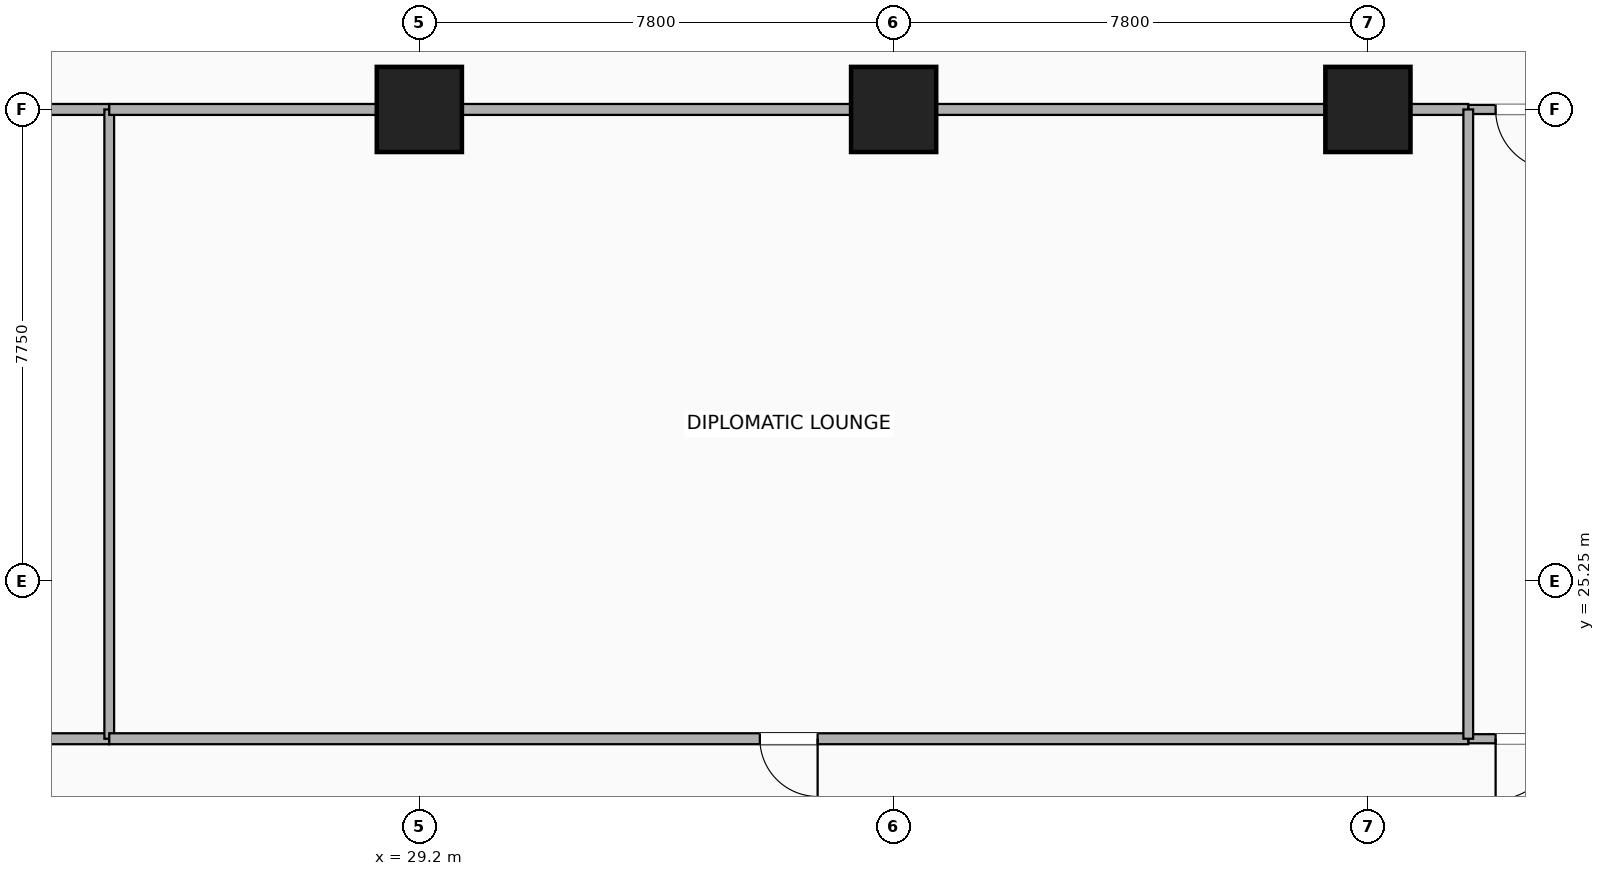
"""IFC4 building model, lengths in metres.
Left out: names, types, materials, properties, quantities, classifications, styles, units other than length and angle.
Written with IfcOpenShell. Run it as: python <this file> out.ifc"""

import sys

from ifc_helpers import new_model, si_unit, direction, frame, frame_2d, origin, origin_2d, place, context, subcontext, project, spatial, rectangle, extrude, element, fill, save


model = new_model("IFC4")
c1 = context("Model", 3, precision=1e-05, world=origin(), true_north=direction((0.0, 1.0)))
c2 = subcontext(c1, "Body", "Model", "MODEL_VIEW")
j1 = project(units=[si_unit("LENGTHUNIT", "METRE"), si_unit("PLANEANGLEUNIT", "RADIAN")], contexts=[c1])
p1 = place(None, origin())
s1 = spatial("IfcSite", under=j1, at=p1, CompositionType="ELEMENT")
p2 = place(p1, origin())
s2 = spatial("IfcBuilding", under=s1, at=p2, CompositionType="ELEMENT")
p3 = place(p2, frame((0.0, 0.0, 68.4)))
s3 = spatial("IfcBuildingStorey", under=s2, at=p3, CompositionType="ELEMENT", Elevation=68.4)
for number, where, z_axis, x_axis in (
    (1, (29.2, 33.0, -0.28), (0.0, 0.0, 1.0), (1.0, 0.0, 0.0)),
    (2, (37.0, 33.0, -0.28), (0.0, 0.0, 1.0), (1.0, 0.0, 0.0)),
    (3, (44.8, 33.0, -0.28), (0.0, 0.0, 1.0), (1.0, 0.0, 0.0)),
):
    element("IfcColumn", number, at=place(p3, frame(where, z_axis=z_axis, x_axis=x_axis)), inside=s3, PredefinedType="COLUMN", context=c2, shape_type="SweptSolid", body=[
        extrude(rectangle(XDim=1.4, YDim=1.4, at=origin_2d()), origin(), (0.0, 0.0, 1.0), 3.5),
    ])
p4 = place(p3, frame((46.45, 22.65, 0.0), z_axis=(0.0, 0.0, 1.0), x_axis=(1.0, 0.0, 0.0)))
e4 = element("IfcWall", 4, at=p4, inside=s3, PredefinedType="PARTITIONING", context=c2, shape_type="SweptSolid", body=[
    extrude(rectangle(XDim=2.0, YDim=0.15, at=frame_2d((1.0, 0.0))), origin(), (0.0, 0.0, 1.0), 3.22),
])
p5 = place(p4, frame((0.45, 0.0, 0.0)))
e5 = element("IfcOpeningElement", 5, at=p5, cuts=e4, PredefinedType="OPENING", context=c2, shape_type="SweptSolid", body=[
    extrude(rectangle(XDim=1.0, YDim=2.15, at=frame_2d((0.5, 1.075))), frame((0.0, 0.085, 0.0), z_axis=(0.0, -1.0, 0.0), x_axis=(1.0, 0.0, 0.0)), (0.0, 0.0, 1.0), 0.17),
])
p6 = place(p3, frame((46.45, 33.0, 0.0), z_axis=(0.0, 0.0, 1.0), x_axis=(1.0, 0.0, 0.0)))
e6 = element("IfcWall", 6, at=p6, inside=s3, PredefinedType="PARTITIONING", context=c2, shape_type="SweptSolid", body=[
    extrude(rectangle(XDim=2.0, YDim=0.15, at=frame_2d((1.0, 0.0))), origin(), (0.0, 0.0, 1.0), 2.51),
])
p7 = place(p6, frame((0.45, 0.0, 0.0)))
e7 = element("IfcOpeningElement", 7, at=p7, cuts=e6, PredefinedType="OPENING", context=c2, shape_type="SweptSolid", body=[
    extrude(rectangle(XDim=1.0, YDim=2.15, at=frame_2d((0.5, 1.075))), frame((0.0, 0.085, 0.0), z_axis=(0.0, -1.0, 0.0), x_axis=(1.0, 0.0, 0.0)), (0.0, 0.0, 1.0), 0.17),
])
p8 = place(p3, frame((18.65, 22.65, 0.0), z_axis=(0.0, 0.0, 1.0), x_axis=(1.0, 0.0, 0.0)))
e8 = element("IfcWall", 8, at=p8, inside=s3, PredefinedType="PARTITIONING", context=c2, shape_type="SweptSolid", body=[
    extrude(rectangle(XDim=5.45, YDim=0.18, at=frame_2d((2.725, 0.0))), origin(), (0.0, 0.0, 1.0), 2.51),
])
p9 = place(p8, frame((2.25, 0.0, 0.0)))
e9 = element("IfcOpeningElement", 9, at=p9, cuts=e8, PredefinedType="OPENING", context=c2, shape_type="SweptSolid", body=[
    extrude(rectangle(XDim=0.95, YDim=2.15, at=frame_2d((0.475, 1.075))), frame((0.0, 0.1, 0.0), z_axis=(0.0, -1.0, 0.0), x_axis=(1.0, 0.0, 0.0)), (0.0, 0.0, 1.0), 0.2),
])
p10 = place(p3, frame((18.65, 33.0, 0.0), z_axis=(0.0, 0.0, 1.0), x_axis=(1.0, 0.0, 0.0)))
e10 = element("IfcWall", 10, at=p10, inside=s3, PredefinedType="PARTITIONING", context=c2, shape_type="SweptSolid", body=[
    extrude(rectangle(XDim=5.45, YDim=0.18, at=frame_2d((2.725, 0.0))), origin(), (0.0, 0.0, 1.0), 2.51),
])
p11 = place(p3, frame((24.1, 22.65, 0.0), z_axis=(0.0, 0.0, 1.0), x_axis=(0.0, 1.0, 0.0)))
e11 = element("IfcWall", 11, at=p11, inside=s3, PredefinedType="PARTITIONING", context=c2, shape_type="SweptSolid", body=[
    extrude(rectangle(XDim=10.35, YDim=0.16, at=frame_2d((5.175, 0.0))), origin(), (0.0, 0.0, 1.0), 2.51),
])
p12 = place(p3, frame((24.1, 22.65, 0.0), z_axis=(0.0, 0.0, 1.0), x_axis=(1.0, 0.0, 0.0)))
e12 = element("IfcWall", 12, at=p12, inside=s3, PredefinedType="PARTITIONING", context=c2, shape_type="SweptSolid", body=[
    extrude(rectangle(XDim=22.35, YDim=0.18, at=frame_2d((11.175, 0.0))), origin(), (0.0, 0.0, 1.0), 2.51),
])
p13 = place(p12, frame((10.7, 0.0, 0.0)))
e13 = element("IfcOpeningElement", 13, at=p13, cuts=e12, PredefinedType="OPENING", context=c2, shape_type="SweptSolid", body=[
    extrude(rectangle(XDim=0.95, YDim=2.15, at=frame_2d((0.475, 1.075))), frame((0.0, 0.1, 0.0), z_axis=(0.0, -1.0, 0.0), x_axis=(1.0, 0.0, 0.0)), (0.0, 0.0, 1.0), 0.2),
])
p14 = place(p3, frame((24.1, 33.0, 0.0), z_axis=(0.0, 0.0, 1.0), x_axis=(1.0, 0.0, 0.0)))
e14 = element("IfcWall", 14, at=p14, inside=s3, PredefinedType="PARTITIONING", context=c2, shape_type="SweptSolid", body=[
    extrude(rectangle(XDim=22.35, YDim=0.18, at=frame_2d((11.175, 0.0))), origin(), (0.0, 0.0, 1.0), 2.51),
])
p15 = place(p3, frame((46.45, 22.65, 0.0), z_axis=(0.0, 0.0, 1.0), x_axis=(0.0, 1.0, 0.0)))
e15 = element("IfcWall", 15, at=p15, inside=s3, PredefinedType="PARTITIONING", context=c2, shape_type="SweptSolid", body=[
    extrude(rectangle(XDim=10.35, YDim=0.16, at=frame_2d((5.175, 0.0))), origin(), (0.0, 0.0, 1.0), 2.51),
])
p16 = place(p5, origin())
e16 = element("IfcDoor", 16, at=p16, inside=s3, OperationType="SINGLE_SWING_LEFT", PredefinedType="DOOR", context=c2, shape_type="SweptSolid", body=[
    extrude(rectangle(XDim=1.0, YDim=2.15, at=frame_2d((0.5, 1.075))), frame((0.0, 0.025, 0.0), z_axis=(0.0, -1.0, 0.0), x_axis=(1.0, 0.0, 0.0)), (0.0, 0.0, 1.0), 0.05),
])
fill(e5, e16)
p17 = place(p7, origin())
e17 = element("IfcDoor", 17, at=p17, inside=s3, OperationType="SINGLE_SWING_RIGHT", PredefinedType="DOOR", context=c2, shape_type="SweptSolid", body=[
    extrude(rectangle(XDim=1.0, YDim=2.15, at=frame_2d((0.5, 1.075))), frame((0.0, 0.025, 0.0), z_axis=(0.0, -1.0, 0.0), x_axis=(1.0, 0.0, 0.0)), (0.0, 0.0, 1.0), 0.05),
])
fill(e7, e17)
p18 = place(p13, origin())
e18 = element("IfcDoor", 18, at=p18, inside=s3, OperationType="SINGLE_SWING_RIGHT", PredefinedType="DOOR", context=c2, shape_type="SweptSolid", body=[
    extrude(rectangle(XDim=0.95, YDim=2.15, at=frame_2d((0.475, 1.075))), frame((0.0, 0.025, 0.0), z_axis=(0.0, -1.0, 0.0), x_axis=(1.0, 0.0, 0.0)), (0.0, 0.0, 1.0), 0.05),
])
fill(e13, e18)
save(model, sys.argv[1])
